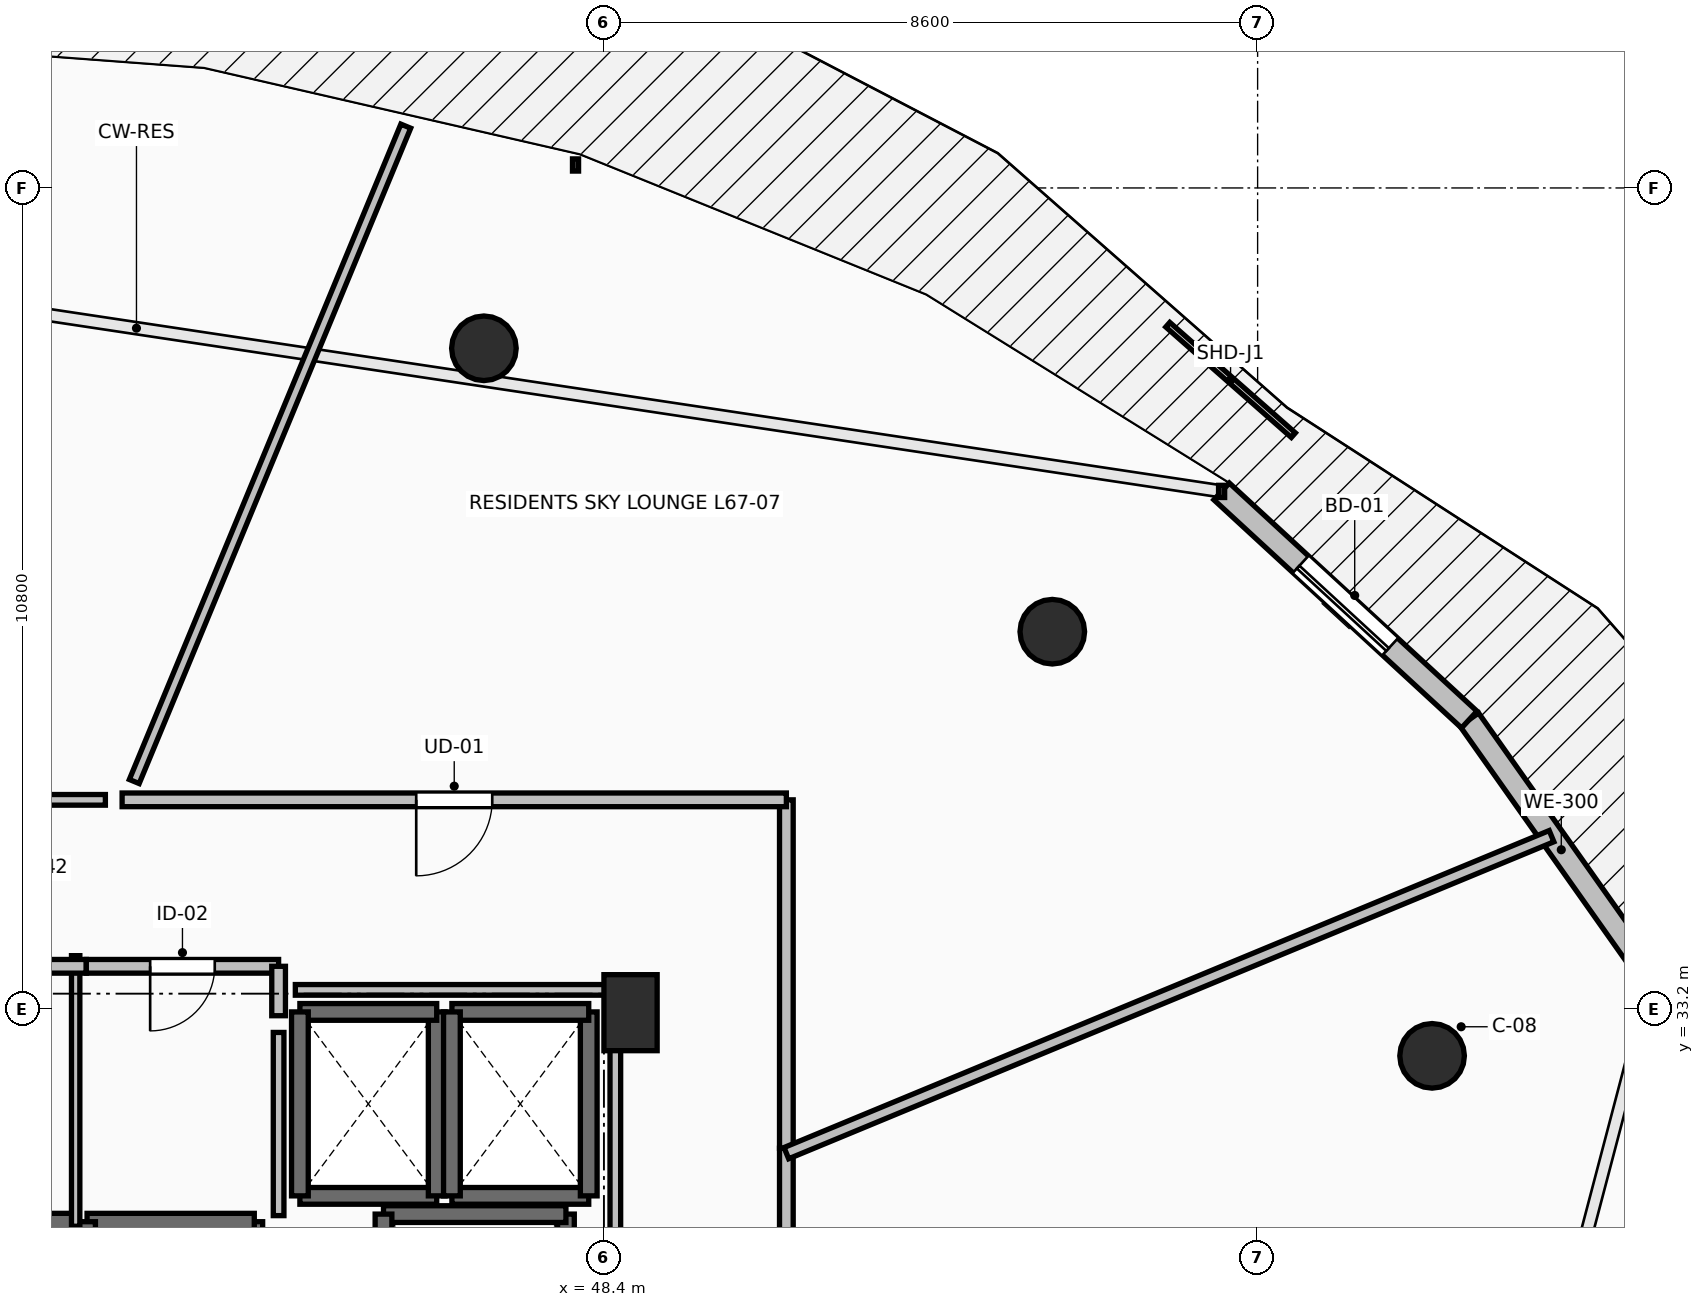
"""IFC4 building model, lengths in metres.
Left out: names, types, materials, properties, quantities, classifications, styles, units other than length and angle.
Written with IfcOpenShell. Run it as: python <this file> out.ifc"""

import sys

from ifc_helpers import new_model, si_unit, direction, frame, frame_2d, origin, origin_2d, place, context, subcontext, project, spatial, rectangle, circle, extrude, element, fill, save


model = new_model("IFC4")
c1 = context("Model", 3, precision=1e-05, world=origin(), true_north=direction((0.0, 1.0)))
c2 = subcontext(c1, "Body", "Model", "MODEL_VIEW")
j1 = project(units=[si_unit("LENGTHUNIT", "METRE"), si_unit("PLANEANGLEUNIT", "RADIAN")], contexts=[c1])
p1 = place(None, origin())
s1 = spatial("IfcSite", under=j1, at=p1, CompositionType="ELEMENT")
p2 = place(p1, origin())
s2 = spatial("IfcBuilding", under=s1, at=p2, CompositionType="ELEMENT")
p3 = place(p2, frame((0.0, 0.0, 248.45)))
s3 = spatial("IfcBuildingStorey", under=s2, at=p3, CompositionType="ELEMENT", Elevation=248.45)
for number, where, z_axis, x_axis in (
    (1, (59.295, 32.582, 0.0), (0.0, 0.0, 1.0), (0.924, 0.383, 0.0)),
    (2, (54.299, 38.162, 0.0), (0.0, 0.0, 1.0), (0.707, 0.707, 0.0)),
    (3, (46.821, 41.891, 0.0), (0.0, 0.0, 1.0), (0.383, 0.924, 0.0)),
):
    element("IfcColumn", number, at=place(p3, frame(where, z_axis=z_axis, x_axis=x_axis)), inside=s3, PredefinedType="COLUMN", context=c2, shape_type="SweptSolid", body=[
        extrude(circle(Radius=0.425, at=origin_2d()), origin(), (0.0, 0.0, 1.0), 3.55),
    ])
p4 = place(p3, frame((48.75, 33.15, 0.0), z_axis=(0.0, 0.0, 1.0), x_axis=(1.0, 0.0, 0.0)))
e4 = element("IfcColumn", 4, at=p4, inside=s3, PredefinedType="PILASTER", context=c2, shape_type="SweptSolid", body=[
    extrude(rectangle(XDim=0.7, YDim=1.0, at=origin_2d()), origin(), (0.0, 0.0, 1.0), 3.55),
])
p5 = place(p3, frame((62.206, 33.581, 0.0), z_axis=(0.0, 0.0, 1.0), x_axis=(-0.577261247247, 0.816559521668, 0.0)))
e5 = element("IfcWall", 5, at=p5, inside=s3, PredefinedType="STANDARD", context=c2, shape_type="SweptSolid", body=[
    extrude(rectangle(XDim=4.194, YDim=0.3, at=frame_2d((2.097, 0.0))), origin(), (0.0, 0.0, 1.0), 3.29),
])
p6 = place(p3, frame((59.784, 37.006, 0.0), z_axis=(0.0, 0.0, 1.0), x_axis=(-0.735445373611, 0.677584018727, 0.0)))
e6 = element("IfcWall", 6, at=p6, inside=s3, PredefinedType="STANDARD", context=c2, shape_type="SweptSolid", body=[
    extrude(rectangle(XDim=4.43, YDim=0.3, at=frame_2d((2.215, 0.0))), origin(), (0.0, 0.0, 1.0), 3.29),
])
p7 = place(p6, frame((1.415, 0.0, 0.0)))
e7 = element("IfcOpeningElement", 7, at=p7, cuts=e6, PredefinedType="OPENING", context=c2, shape_type="SweptSolid", body=[
    extrude(rectangle(XDim=1.6, YDim=2.3, at=frame_2d((0.8, 1.15))), frame((0.0, 0.165, 0.0), z_axis=(0.0, -1.0, 0.0), x_axis=(1.0, 0.0, 0.0)), (0.0, 0.0, 1.0), 0.33),
])
p8 = place(p3, frame((41.4, 27.8, 0.0), z_axis=(0.0, 0.0, 1.0), x_axis=(0.0, 1.0, 0.0)))
e8 = element("IfcWall", 8, at=p8, inside=s3, PredefinedType="SOLIDWALL", context=c2, shape_type="SweptSolid", body=[
    extrude(rectangle(XDim=2.6, YDim=0.22, at=frame_2d((1.3, 0.0))), origin(), (0.0, 0.0, 1.0), 3.29),
])
p9 = place(p3, frame((41.4, 30.4, 0.0), z_axis=(0.0, 0.0, 1.0), x_axis=(-1.0, 0.0, 0.0)))
e9 = element("IfcWall", 9, at=p9, inside=s3, PredefinedType="SOLIDWALL", context=c2, shape_type="SweptSolid", body=[
    extrude(rectangle(XDim=2.2, YDim=0.22, at=frame_2d((1.1, 0.0))), origin(), (0.0, 0.0, 1.0), 3.29),
])
p10 = place(p3, frame((43.8, 27.8, 0.0), z_axis=(0.0, 0.0, 1.0), x_axis=(0.0, 1.0, 0.0)))
e10 = element("IfcWall", 10, at=p10, inside=s3, PredefinedType="SOLIDWALL", context=c2, shape_type="SweptSolid", body=[
    extrude(rectangle(XDim=2.6, YDim=0.22, at=frame_2d((1.3, 0.0))), origin(), (0.0, 0.0, 1.0), 3.29),
])
p11 = place(p3, frame((43.8, 30.4, 0.0), z_axis=(0.0, 0.0, 1.0), x_axis=(-1.0, 0.0, 0.0)))
e11 = element("IfcWall", 11, at=p11, inside=s3, PredefinedType="SOLIDWALL", context=c2, shape_type="SweptSolid", body=[
    extrude(rectangle(XDim=2.2, YDim=0.22, at=frame_2d((1.1, 0.0))), origin(), (0.0, 0.0, 1.0), 3.29),
])
p12 = place(p3, frame((41.6, 30.4, 0.0), z_axis=(0.0, 0.0, 1.0), x_axis=(0.0, -1.0, 0.0)))
e12 = element("IfcWall", 12, at=p12, inside=s3, PredefinedType="SOLIDWALL", context=c2, shape_type="SweptSolid", body=[
    extrude(rectangle(XDim=2.6, YDim=0.22, at=frame_2d((1.3, 0.0))), origin(), (0.0, 0.0, 1.0), 3.29),
])
p13 = place(p3, frame((44.4, 30.74, 0.0), z_axis=(0.0, 0.0, 1.0), x_axis=(1.0, 0.0, 0.0)))
e13 = element("IfcWall", 13, at=p13, inside=s3, PredefinedType="SOLIDWALL", context=c2, shape_type="SweptSolid", body=[
    extrude(rectangle(XDim=1.8, YDim=0.22, at=frame_2d((0.9, 0.0))), origin(), (0.0, 0.0, 1.0), 3.29),
])
p14 = place(p3, frame((46.2, 30.74, 0.0), z_axis=(0.0, 0.0, 1.0), x_axis=(0.0, 1.0, 0.0)))
e14 = element("IfcWall", 14, at=p14, inside=s3, PredefinedType="SOLIDWALL", context=c2, shape_type="SweptSolid", body=[
    extrude(rectangle(XDim=2.42, YDim=0.22, at=frame_2d((1.21, 0.0))), origin(), (0.0, 0.0, 1.0), 3.29),
])
p15 = place(p3, frame((46.2, 33.16, 0.0), z_axis=(0.0, 0.0, 1.0), x_axis=(-1.0, 0.0, 0.0)))
e15 = element("IfcWall", 15, at=p15, inside=s3, PredefinedType="SOLIDWALL", context=c2, shape_type="SweptSolid", body=[
    extrude(rectangle(XDim=1.8, YDim=0.22, at=frame_2d((0.9, 0.0))), origin(), (0.0, 0.0, 1.0), 3.29),
])
p16 = place(p3, frame((44.4, 33.16, 0.0), z_axis=(0.0, 0.0, 1.0), x_axis=(0.0, -1.0, 0.0)))
e16 = element("IfcWall", 16, at=p16, inside=s3, PredefinedType="SOLIDWALL", context=c2, shape_type="SweptSolid", body=[
    extrude(rectangle(XDim=2.42, YDim=0.22, at=frame_2d((1.21, 0.0))), origin(), (0.0, 0.0, 1.0), 3.29),
])
p17 = place(p3, frame((46.4, 30.74, 0.0), z_axis=(0.0, 0.0, 1.0), x_axis=(1.0, 0.0, 0.0)))
e17 = element("IfcWall", 17, at=p17, inside=s3, PredefinedType="SOLIDWALL", context=c2, shape_type="SweptSolid", body=[
    extrude(rectangle(XDim=1.8, YDim=0.22, at=frame_2d((0.9, 0.0))), origin(), (0.0, 0.0, 1.0), 3.29),
])
p18 = place(p3, frame((48.2, 30.74, 0.0), z_axis=(0.0, 0.0, 1.0), x_axis=(0.0, 1.0, 0.0)))
e18 = element("IfcWall", 18, at=p18, inside=s3, PredefinedType="SOLIDWALL", context=c2, shape_type="SweptSolid", body=[
    extrude(rectangle(XDim=2.42, YDim=0.22, at=frame_2d((1.21, 0.0))), origin(), (0.0, 0.0, 1.0), 3.29),
])
p19 = place(p3, frame((48.2, 33.16, 0.0), z_axis=(0.0, 0.0, 1.0), x_axis=(-1.0, 0.0, 0.0)))
e19 = element("IfcWall", 19, at=p19, inside=s3, PredefinedType="SOLIDWALL", context=c2, shape_type="SweptSolid", body=[
    extrude(rectangle(XDim=1.8, YDim=0.22, at=frame_2d((0.9, 0.0))), origin(), (0.0, 0.0, 1.0), 3.29),
])
p20 = place(p3, frame((46.4, 33.16, 0.0), z_axis=(0.0, 0.0, 1.0), x_axis=(0.0, -1.0, 0.0)))
e20 = element("IfcWall", 20, at=p20, inside=s3, PredefinedType="SOLIDWALL", context=c2, shape_type="SweptSolid", body=[
    extrude(rectangle(XDim=2.42, YDim=0.22, at=frame_2d((1.21, 0.0))), origin(), (0.0, 0.0, 1.0), 3.29),
])
p21 = place(p3, frame((47.9, 28.0, 0.0), z_axis=(0.0, 0.0, 1.0), x_axis=(0.0, 1.0, 0.0)))
e21 = element("IfcWall", 21, at=p21, inside=s3, PredefinedType="SHEAR", context=c2, shape_type="SweptSolid", body=[
    extrude(rectangle(XDim=2.5, YDim=0.22, at=frame_2d((1.25, 0.0))), origin(), (0.0, 0.0, 1.0), 3.29),
])
p22 = place(p3, frame((47.9, 30.5, 0.0), z_axis=(0.0, 0.0, 1.0), x_axis=(-1.0, 0.0, 0.0)))
e22 = element("IfcWall", 22, at=p22, inside=s3, PredefinedType="SHEAR", context=c2, shape_type="SweptSolid", body=[
    extrude(rectangle(XDim=2.4, YDim=0.22, at=frame_2d((1.2, 0.0))), origin(), (0.0, 0.0, 1.0), 3.29),
])
p23 = place(p3, frame((45.5, 30.5, 0.0), z_axis=(0.0, 0.0, 1.0), x_axis=(0.0, -1.0, 0.0)))
e23 = element("IfcWall", 23, at=p23, inside=s3, PredefinedType="SHEAR", context=c2, shape_type="SweptSolid", body=[
    extrude(rectangle(XDim=2.5, YDim=0.22, at=frame_2d((1.25, 0.0))), origin(), (0.0, 0.0, 1.0), 3.29),
])
p24 = place(p3, frame((41.45, 30.34, 0.0), z_axis=(0.0, 0.0, 1.0), x_axis=(0.0, 1.0, 0.0)))
e24 = element("IfcWall", 24, at=p24, inside=s3, PredefinedType="PARTITIONING", context=c2, shape_type="SweptSolid", body=[
    extrude(rectangle(XDim=3.56, YDim=0.11, at=frame_2d((1.78, 0.0))), origin(), (0.0, 0.0, 1.0), 3.29),
])
p25 = place(p3, frame((41.59, 33.76, 0.0), z_axis=(0.0, 0.0, 1.0), x_axis=(-1.0, 0.0, 0.0)))
e25 = element("IfcWall", 25, at=p25, inside=s3, PredefinedType="PARTITIONING", context=c2, shape_type="SweptSolid", body=[
    extrude(rectangle(XDim=3.44, YDim=0.18, at=frame_2d((1.72, 0.0))), origin(), (0.0, 0.0, 1.0), 3.29),
])
p26 = place(p25, frame((1.295, 0.0, 0.0)))
e26 = element("IfcOpeningElement", 26, at=p26, cuts=e25, PredefinedType="OPENING", context=c2, shape_type="SweptSolid", body=[
    extrude(rectangle(XDim=0.85, YDim=2.1, at=frame_2d((0.425, 1.05))), frame((0.0, 0.105, 0.0), z_axis=(0.0, -1.0, 0.0), x_axis=(1.0, 0.0, 0.0)), (0.0, 0.0, 1.0), 0.21),
])
p27 = place(p3, frame((44.12, 33.76, 0.0), z_axis=(0.0, 0.0, 1.0), x_axis=(-1.0, 0.0, 0.0)))
e27 = element("IfcWall", 27, at=p27, inside=s3, PredefinedType="PARTITIONING", context=c2, shape_type="SweptSolid", body=[
    extrude(rectangle(XDim=2.53, YDim=0.18, at=frame_2d((1.265, 0.0))), origin(), (0.0, 0.0, 1.0), 3.29),
])
p28 = place(p27, frame((0.84, 0.0, 0.0)))
e28 = element("IfcOpeningElement", 28, at=p28, cuts=e27, PredefinedType="OPENING", context=c2, shape_type="SweptSolid", body=[
    extrude(rectangle(XDim=0.85, YDim=2.1, at=frame_2d((0.425, 1.05))), frame((0.0, 0.105, 0.0), z_axis=(0.0, -1.0, 0.0), x_axis=(1.0, 0.0, 0.0)), (0.0, 0.0, 1.0), 0.21),
])
p29 = place(p3, frame((44.12, 33.11, 0.0), z_axis=(0.0, 0.0, 1.0), x_axis=(0.0, 1.0, 0.0)))
e29 = element("IfcWall", 29, at=p29, inside=s3, PredefinedType="PARTITIONING", context=c2, shape_type="SweptSolid", body=[
    extrude(rectangle(XDim=0.65, YDim=0.18, at=frame_2d((0.325, 0.0))), origin(), (0.0, 0.0, 1.0), 3.29),
])
p30 = place(p3, frame((50.8, 20.758, 0.0), z_axis=(0.0, 0.0, 1.0), x_axis=(0.0, 1.0, 0.0)))
e30 = element("IfcWall", 30, at=p30, inside=s3, PredefinedType="PARTITIONING", context=c2, shape_type="SweptSolid", body=[
    extrude(rectangle(XDim=10.609, YDim=0.18, at=frame_2d((5.304, 0.0))), origin(), (0.0, 0.0, 1.0), 2.482),
])
p31 = place(p30, frame((4.804, 0.0, 0.0)))
e31 = element("IfcOpeningElement", 31, at=p31, cuts=e30, PredefinedType="OPENING", context=c2, shape_type="SweptSolid", body=[
    extrude(rectangle(XDim=1.0, YDim=2.15, at=frame_2d((0.5, 1.075))), frame((0.0, 0.105, 0.0), z_axis=(0.0, -1.0, 0.0), x_axis=(1.0, 0.0, 0.0)), (0.0, 0.0, 1.0), 0.21),
])
p32 = place(p3, frame((50.8, 31.367, 0.0), z_axis=(0.0, 0.0, 1.0), x_axis=(0.0, 1.0, 0.0)))
e32 = element("IfcWall", 32, at=p32, inside=s3, PredefinedType="PARTITIONING", context=c2, shape_type="SweptSolid", body=[
    extrude(rectangle(XDim=4.583, YDim=0.18, at=frame_2d((2.292, 0.0))), origin(), (0.0, 0.0, 1.0), 2.482),
])
p33 = place(p3, frame((50.8, 35.95, 0.0), z_axis=(0.0, 0.0, 1.0), x_axis=(-1.0, 0.0, 0.0)))
e33 = element("IfcWall", 33, at=p33, inside=s3, PredefinedType="PARTITIONING", context=c2, shape_type="SweptSolid", body=[
    extrude(rectangle(XDim=8.739, YDim=0.18, at=frame_2d((4.37, 0.0))), origin(), (0.0, 0.0, 1.0), 2.482),
])
p34 = place(p33, frame((3.869, 0.0, 0.0)))
e34 = element("IfcOpeningElement", 34, at=p34, cuts=e33, PredefinedType="OPENING", context=c2, shape_type="SweptSolid", body=[
    extrude(rectangle(XDim=1.0, YDim=2.15, at=frame_2d((0.5, 1.075))), frame((0.0, 0.105, 0.0), z_axis=(0.0, -1.0, 0.0), x_axis=(1.0, 0.0, 0.0)), (0.0, 0.0, 1.0), 0.21),
])
p35 = place(p3, frame((60.867, 35.472, 0.0), z_axis=(0.0, 0.0, 1.0), x_axis=(-0.923877013663, -0.382689513347, 0.0)))
e35 = element("IfcWall", 35, at=p35, inside=s3, PredefinedType="PARTITIONING", context=c2, shape_type="SweptSolid", body=[
    extrude(rectangle(XDim=10.896, YDim=0.16, at=frame_2d((5.448, 0.0))), origin(), (0.0, 0.0, 1.0), 2.482),
])
p36 = place(p3, frame((44.12, 30.48, 0.0), z_axis=(0.0, 0.0, 1.0), x_axis=(0.0, 1.0, 0.0)))
e36 = element("IfcWall", 36, at=p36, inside=s3, PredefinedType="PARTITIONING", context=c2, shape_type="SweptSolid", body=[
    extrude(rectangle(XDim=2.41, YDim=0.14, at=frame_2d((1.205, 0.0))), origin(), (0.0, 0.0, 1.0), 3.29),
])
p37 = place(p3, frame((41.841, 35.95, 0.0), z_axis=(0.0, 0.0, 1.0), x_axis=(-1.0, 0.0, 0.0)))
e37 = element("IfcWall", 37, at=p37, inside=s3, PredefinedType="PARTITIONING", context=c2, shape_type="SweptSolid", body=[
    extrude(rectangle(XDim=2.391, YDim=0.14, at=frame_2d((1.196, 0.0))), origin(), (0.0, 0.0, 1.0), 3.022),
])
p38 = place(p3, frame((48.55, 28.196, 0.0), z_axis=(0.0, 0.0, 1.0), x_axis=(0.0, 1.0, 0.0)))
e38 = element("IfcWall", 38, at=p38, inside=s3, PredefinedType="PARTITIONING", context=c2, shape_type="SweptSolid", body=[
    extrude(rectangle(XDim=5.254, YDim=0.14, at=frame_2d((2.627, 0.0))), origin(), (0.0, 0.0, 1.0), 2.482),
])
p39 = place(p3, frame((48.55, 33.45, 0.0), z_axis=(0.0, 0.0, 1.0), x_axis=(-1.0, 0.0, 0.0)))
e39 = element("IfcWall", 39, at=p39, inside=s3, PredefinedType="PARTITIONING", context=c2, shape_type="SweptSolid", body=[
    extrude(rectangle(XDim=4.21, YDim=0.14, at=frame_2d((2.105, 0.0))), origin(), (0.0, 0.0, 1.0), 2.482),
])
p40 = place(p3, frame((45.793, 44.813, 0.0), z_axis=(0.0, 0.0, 1.0), x_axis=(-0.382742241568, -0.923855170749, 0.0)))
e40 = element("IfcWall", 40, at=p40, inside=s3, PredefinedType="PARTITIONING", context=c2, shape_type="SweptSolid", body=[
    extrude(rectangle(XDim=9.333, YDim=0.14, at=frame_2d((4.667, 0.0))), origin(), (0.0, 0.0, 1.0), 2.874),
])
p41 = place(p7, origin())
e41 = element("IfcDoor", 41, at=p41, inside=s3, OperationType="SLIDING_TO_LEFT", PredefinedType="DOOR", context=c2, shape_type="SweptSolid", body=[
    extrude(rectangle(XDim=1.6, YDim=2.3, at=frame_2d((0.8, 1.15))), frame((0.0, 0.025, 0.0), z_axis=(0.0, -1.0, 0.0), x_axis=(1.0, 0.0, 0.0)), (0.0, 0.0, 1.0), 0.05),
])
fill(e7, e41)
p42 = place(p28, origin())
e42 = element("IfcDoor", 42, at=p42, inside=s3, OperationType="SINGLE_SWING_RIGHT", PredefinedType="DOOR", context=c2, shape_type="SweptSolid", body=[
    extrude(rectangle(XDim=0.85, YDim=2.1, at=frame_2d((0.425, 1.05))), frame((0.0, 0.025, 0.0), z_axis=(0.0, -1.0, 0.0), x_axis=(1.0, 0.0, 0.0)), (0.0, 0.0, 1.0), 0.05),
])
fill(e28, e42)
p43 = place(p34, origin())
e43 = element("IfcDoor", 43, at=p43, inside=s3, OperationType="SINGLE_SWING_RIGHT", PredefinedType="DOOR", context=c2, shape_type="SweptSolid", body=[
    extrude(rectangle(XDim=1.0, YDim=2.15, at=frame_2d((0.5, 1.075))), frame((0.0, 0.025, 0.0), z_axis=(0.0, -1.0, 0.0), x_axis=(1.0, 0.0, 0.0)), (0.0, 0.0, 1.0), 0.05),
])
fill(e34, e43)
save(model, sys.argv[1])
